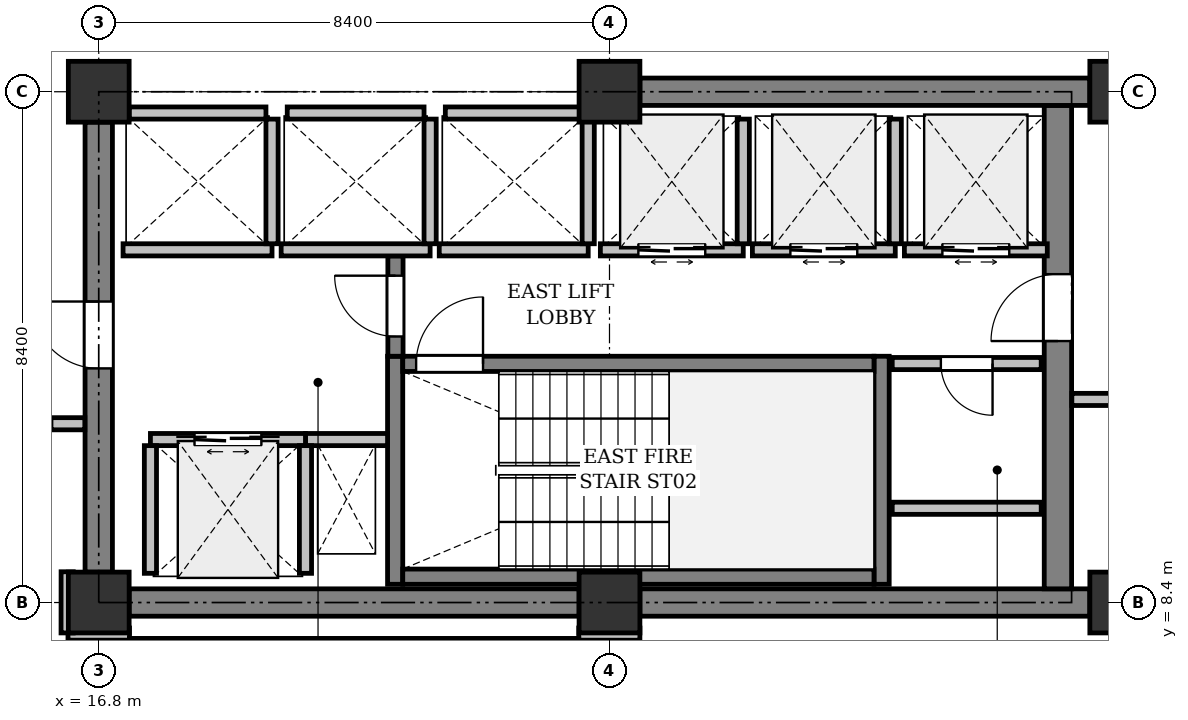
"""IFC4 building model, lengths in metres.
Left out: names, types, materials, properties, quantities, classifications, styles, units other than length and angle.
Written with IfcOpenShell. Run it as: python <this file> out.ifc"""

import sys

from ifc_helpers import new_model, si_unit, direction, frame, frame_2d, origin, origin_2d, place, context, subcontext, project, spatial, rectangle, extrude, element, fill, save


model = new_model("IFC4")
c1 = context("Model", 3, precision=1e-05, world=origin(), true_north=direction((0.0, 1.0)))
c2 = subcontext(c1, "Body", "Model", "MODEL_VIEW")
j1 = project(units=[si_unit("LENGTHUNIT", "METRE"), si_unit("PLANEANGLEUNIT", "RADIAN")], contexts=[c1])
p1 = place(None, origin())
s1 = spatial("IfcSite", under=j1, at=p1, CompositionType="ELEMENT")
p2 = place(p1, origin())
s2 = spatial("IfcBuilding", under=s1, at=p2, CompositionType="ELEMENT")
p3 = place(p2, frame((0.0, 0.0, 224.7)))
s3 = spatial("IfcBuildingStorey", under=s2, at=p3, CompositionType="ELEMENT", Elevation=224.7)
for number, where, z_axis, x_axis in (
    (1, (16.8, 8.4, 0.0), (0.0, 0.0, 1.0), (1.0, 0.0, 0.0)),
    (2, (16.8, 16.8, 0.0), (0.0, 0.0, 1.0), (1.0, 0.0, 0.0)),
    (3, (25.2, 8.4, 0.0), (0.0, 0.0, 1.0), (1.0, 0.0, 0.0)),
    (4, (25.2, 16.8, 0.0), (0.0, 0.0, 1.0), (1.0, 0.0, 0.0)),
    (5, (33.6, 8.4, 0.0), (0.0, 0.0, 1.0), (1.0, 0.0, 0.0)),
    (6, (33.6, 16.8, 0.0), (0.0, 0.0, 1.0), (1.0, 0.0, 0.0)),
):
    element("IfcColumn", number, at=place(p3, frame(where, z_axis=z_axis, x_axis=x_axis)), inside=s3, PredefinedType="COLUMN", context=c2, shape_type="SweptSolid", body=[
        extrude(rectangle(XDim=1.0, YDim=1.0, at=origin_2d()), origin(), (0.0, 0.0, 1.0), 4.1),
    ])
p4 = place(p3, frame((17.3, 8.4, 0.0), z_axis=(0.0, 0.0, 1.0), x_axis=(1.0, 0.0, 0.0)))
e7 = element("IfcWall", 7, at=p4, inside=s3, PredefinedType="SHEAR", context=c2, shape_type="SweptSolid", body=[
    extrude(rectangle(XDim=7.4, YDim=0.45, at=frame_2d((3.7, 0.0))), origin(), (0.0, 0.0, 1.0), 3.825),
])
p5 = place(p3, frame((25.7, 8.4, 0.0), z_axis=(0.0, 0.0, 1.0), x_axis=(1.0, 0.0, 0.0)))
e8 = element("IfcWall", 8, at=p5, inside=s3, PredefinedType="SHEAR", context=c2, shape_type="SweptSolid", body=[
    extrude(rectangle(XDim=7.4, YDim=0.45, at=frame_2d((3.7, 0.0))), origin(), (0.0, 0.0, 1.0), 3.825),
])
p6 = place(p3, frame((32.575, 8.625, 0.0), z_axis=(0.0, 0.0, 1.0), x_axis=(0.0, 1.0, 0.0)))
e9 = element("IfcWall", 9, at=p6, inside=s3, PredefinedType="SHEAR", context=c2, shape_type="SweptSolid", body=[
    extrude(rectangle(XDim=7.95, YDim=0.45, at=frame_2d((3.975, 0.0))), origin(), (0.0, 0.0, 1.0), 3.825),
])
p7 = place(p6, frame((4.075, 0.0, 0.0)))
e10 = element("IfcOpeningElement", 10, at=p7, cuts=e9, PredefinedType="OPENING", context=c2, shape_type="SweptSolid", body=[
    extrude(rectangle(XDim=1.1, YDim=2.15, at=frame_2d((0.55, 1.075))), frame((0.0, 0.235, 0.0), z_axis=(0.0, -1.0, 0.0), x_axis=(1.0, 0.0, 0.0)), (0.0, 0.0, 1.0), 0.47),
])
p8 = place(p3, frame((16.8, 8.9, 0.0), z_axis=(0.0, 0.0, 1.0), x_axis=(0.0, 1.0, 0.0)))
e11 = element("IfcWall", 11, at=p8, inside=s3, PredefinedType="SHEAR", context=c2, shape_type="SweptSolid", body=[
    extrude(rectangle(XDim=7.4, YDim=0.45, at=frame_2d((3.7, 0.0))), origin(), (0.0, 0.0, 1.0), 3.825),
])
p9 = place(p8, frame((3.35, 0.0, 0.0)))
e12 = element("IfcOpeningElement", 12, at=p9, cuts=e11, PredefinedType="OPENING", context=c2, shape_type="SweptSolid", body=[
    extrude(rectangle(XDim=1.1, YDim=2.15, at=frame_2d((0.55, 1.075))), frame((0.0, 0.235, 0.0), z_axis=(0.0, -1.0, 0.0), x_axis=(1.0, 0.0, 0.0)), (0.0, 0.0, 1.0), 0.47),
])
p10 = place(p3, frame((25.7, 16.8, 0.0), z_axis=(0.0, 0.0, 1.0), x_axis=(1.0, 0.0, 0.0)))
e13 = element("IfcWall", 13, at=p10, inside=s3, PredefinedType="SHEAR", context=c2, shape_type="SweptSolid", body=[
    extrude(rectangle(XDim=7.4, YDim=0.45, at=frame_2d((3.7, 0.0))), origin(), (0.0, 0.0, 1.0), 3.825),
])
for number, where, z_axis, x_axis in (
    (14, (21.675, 8.7, 0.0), (0.0, 0.0, 1.0), (0.0, 1.0, 0.0)),
    (15, (29.675, 8.7, 0.0), (0.0, 0.0, 1.0), (0.0, 1.0, 0.0)),
):
    element("IfcWall", number, at=place(p3, frame(where, z_axis=z_axis, x_axis=x_axis)), inside=s3, PredefinedType="SHEAR", context=c2, shape_type="SweptSolid", body=[
        extrude(rectangle(XDim=3.75, YDim=0.25, at=frame_2d((1.875, 0.0))), origin(), (0.0, 0.0, 1.0), 3.825),
    ])
p11 = place(p3, frame((21.8, 8.825, 0.0), z_axis=(0.0, 0.0, 1.0), x_axis=(1.0, 0.0, 0.0)))
e16 = element("IfcWall", 16, at=p11, inside=s3, PredefinedType="SHEAR", context=c2, shape_type="SweptSolid", body=[
    extrude(rectangle(XDim=7.75, YDim=0.25, at=frame_2d((3.875, 0.0))), origin(), (0.0, 0.0, 1.0), 3.825),
])
p12 = place(p3, frame((21.8, 12.325, 0.0), z_axis=(0.0, 0.0, 1.0), x_axis=(1.0, 0.0, 0.0)))
e17 = element("IfcWall", 17, at=p12, inside=s3, PredefinedType="SHEAR", context=c2, shape_type="SweptSolid", body=[
    extrude(rectangle(XDim=7.75, YDim=0.25, at=frame_2d((3.875, 0.0))), origin(), (0.0, 0.0, 1.0), 3.825),
])
p13 = place(p12, frame((0.22, 0.0, 0.0)))
e18 = element("IfcOpeningElement", 18, at=p13, cuts=e17, PredefinedType="OPENING", context=c2, shape_type="SweptSolid", body=[
    extrude(rectangle(XDim=1.1, YDim=2.15, at=frame_2d((0.55, 1.075))), frame((0.0, 0.135, 0.0), z_axis=(0.0, -1.0, 0.0), x_axis=(1.0, 0.0, 0.0)), (0.0, 0.0, 1.0), 0.27),
])
p14 = place(p3, frame((20.2, 11.08, 0.0), z_axis=(0.0, 0.0, 1.0), x_axis=(1.0, 0.0, 0.0)))
e19 = element("IfcWall", 19, at=p14, inside=s3, PredefinedType="PARTITIONING", context=c2, shape_type="SweptSolid", body=[
    extrude(rectangle(XDim=1.35, YDim=0.2, at=frame_2d((0.675, 0.0))), origin(), (0.0, 0.0, 1.0), 3.825),
])
p15 = place(p3, frame((21.68, 12.45, 0.0), z_axis=(0.0, 0.0, 1.0), x_axis=(0.0, 1.0, 0.0)))
e20 = element("IfcWall", 20, at=p15, inside=s3, PredefinedType="SHEAR", context=c2, shape_type="SweptSolid", body=[
    extrude(rectangle(XDim=1.65, YDim=0.25, at=frame_2d((0.825, 0.0))), origin(), (0.0, 0.0, 1.0), 3.825),
])
p16 = place(p15, frame((0.325, 0.0, 0.0)))
e21 = element("IfcOpeningElement", 21, at=p16, cuts=e20, PredefinedType="OPENING", context=c2, shape_type="SweptSolid", body=[
    extrude(rectangle(XDim=1.0, YDim=2.15, at=frame_2d((0.5, 1.075))), frame((0.0, 0.135, 0.0), z_axis=(0.0, -1.0, 0.0), x_axis=(1.0, 0.0, 0.0)), (0.0, 0.0, 1.0), 0.27),
])
p17 = place(p3, frame((17.65, 11.08, 0.0), z_axis=(0.0, 0.0, 1.0), x_axis=(1.0, 0.0, 0.0)))
e22 = element("IfcWall", 22, at=p17, inside=s3, PredefinedType="PARTITIONING", context=c2, shape_type="SweptSolid", body=[
    extrude(rectangle(XDim=2.55, YDim=0.2, at=frame_2d((1.275, 0.0))), origin(), (0.0, 0.0, 1.0), 3.825),
])
p18 = place(p17, frame((0.725, 0.0, 0.0)))
e23 = element("IfcOpeningElement", 23, at=p18, cuts=e22, PredefinedType="OPENING", context=c2, shape_type="SweptSolid", body=[
    extrude(rectangle(XDim=1.1, YDim=2.2, at=frame_2d((0.55, 1.1))), frame((0.0, 0.11, 0.0), z_axis=(0.0, -1.0, 0.0), x_axis=(1.0, 0.0, 0.0)), (0.0, 0.0, 1.0), 0.22),
])
for number, where, z_axis, x_axis in (
    (24, (20.2, 8.88, 0.0), (0.0, 0.0, 1.0), (0.0, 1.0, 0.0)),
    (25, (17.65, 8.88, 0.0), (0.0, 0.0, 1.0), (0.0, 1.0, 0.0)),
):
    element("IfcWall", number, at=place(p3, frame(where, z_axis=z_axis, x_axis=x_axis)), inside=s3, PredefinedType="PARTITIONING", context=c2, shape_type="SweptSolid", body=[
        extrude(rectangle(XDim=2.1, YDim=0.2, at=frame_2d((1.05, 0.0))), origin(), (0.0, 0.0, 1.0), 3.825),
    ])
p19 = place(p3, frame((17.2, 14.2, 0.0), z_axis=(0.0, 0.0, 1.0), x_axis=(1.0, 0.0, 0.0)))
e26 = element("IfcWall", 26, at=p19, inside=s3, PredefinedType="PARTITIONING", context=c2, shape_type="SweptSolid", body=[
    extrude(rectangle(XDim=2.45, YDim=0.2, at=frame_2d((1.225, 0.0))), origin(), (0.0, 0.0, 1.0), 3.825),
])
p20 = place(p3, frame((19.65, 14.3, 0.0), z_axis=(0.0, 0.0, 1.0), x_axis=(0.0, 1.0, 0.0)))
e27 = element("IfcWall", 27, at=p20, inside=s3, PredefinedType="PARTITIONING", context=c2, shape_type="SweptSolid", body=[
    extrude(rectangle(XDim=2.05, YDim=0.2, at=frame_2d((1.025, 0.0))), origin(), (0.0, 0.0, 1.0), 3.825),
])
p21 = place(p3, frame((17.3, 16.45, 0.0), z_axis=(0.0, 0.0, 1.0), x_axis=(1.0, 0.0, 0.0)))
e28 = element("IfcWall", 28, at=p21, inside=s3, PredefinedType="PARTITIONING", context=c2, shape_type="SweptSolid", body=[
    extrude(rectangle(XDim=2.25, YDim=0.2, at=frame_2d((1.125, 0.0))), origin(), (0.0, 0.0, 1.0), 3.825),
])
p22 = place(p3, frame((19.8, 14.2, 0.0), z_axis=(0.0, 0.0, 1.0), x_axis=(1.0, 0.0, 0.0)))
e29 = element("IfcWall", 29, at=p22, inside=s3, PredefinedType="PARTITIONING", context=c2, shape_type="SweptSolid", body=[
    extrude(rectangle(XDim=2.45, YDim=0.2, at=frame_2d((1.225, 0.0))), origin(), (0.0, 0.0, 1.0), 3.825),
])
p23 = place(p3, frame((22.25, 14.3, 0.0), z_axis=(0.0, 0.0, 1.0), x_axis=(0.0, 1.0, 0.0)))
e30 = element("IfcWall", 30, at=p23, inside=s3, PredefinedType="PARTITIONING", context=c2, shape_type="SweptSolid", body=[
    extrude(rectangle(XDim=2.05, YDim=0.2, at=frame_2d((1.025, 0.0))), origin(), (0.0, 0.0, 1.0), 3.825),
])
p24 = place(p3, frame((19.9, 16.45, 0.0), z_axis=(0.0, 0.0, 1.0), x_axis=(1.0, 0.0, 0.0)))
e31 = element("IfcWall", 31, at=p24, inside=s3, PredefinedType="PARTITIONING", context=c2, shape_type="SweptSolid", body=[
    extrude(rectangle(XDim=2.25, YDim=0.2, at=frame_2d((1.125, 0.0))), origin(), (0.0, 0.0, 1.0), 3.825),
])
p25 = place(p3, frame((22.4, 14.2, 0.0), z_axis=(0.0, 0.0, 1.0), x_axis=(1.0, 0.0, 0.0)))
e32 = element("IfcWall", 32, at=p25, inside=s3, PredefinedType="PARTITIONING", context=c2, shape_type="SweptSolid", body=[
    extrude(rectangle(XDim=2.45, YDim=0.2, at=frame_2d((1.225, 0.0))), origin(), (0.0, 0.0, 1.0), 3.825),
])
p26 = place(p3, frame((24.85, 14.3, 0.0), z_axis=(0.0, 0.0, 1.0), x_axis=(0.0, 1.0, 0.0)))
e33 = element("IfcWall", 33, at=p26, inside=s3, PredefinedType="PARTITIONING", context=c2, shape_type="SweptSolid", body=[
    extrude(rectangle(XDim=2.05, YDim=0.2, at=frame_2d((1.025, 0.0))), origin(), (0.0, 0.0, 1.0), 3.825),
])
p27 = place(p3, frame((22.5, 16.45, 0.0), z_axis=(0.0, 0.0, 1.0), x_axis=(1.0, 0.0, 0.0)))
e34 = element("IfcWall", 34, at=p27, inside=s3, PredefinedType="PARTITIONING", context=c2, shape_type="SweptSolid", body=[
    extrude(rectangle(XDim=2.25, YDim=0.2, at=frame_2d((1.125, 0.0))), origin(), (0.0, 0.0, 1.0), 3.825),
])
p28 = place(p3, frame((25.05, 14.2, 0.0), z_axis=(0.0, 0.0, 1.0), x_axis=(1.0, 0.0, 0.0)))
e35 = element("IfcWall", 35, at=p28, inside=s3, PredefinedType="PARTITIONING", context=c2, shape_type="SweptSolid", body=[
    extrude(rectangle(XDim=2.35, YDim=0.2, at=frame_2d((1.175, 0.0))), origin(), (0.0, 0.0, 1.0), 3.825),
])
p29 = place(p28, frame((0.625, 0.0, 0.0)))
e36 = element("IfcOpeningElement", 36, at=p29, cuts=e35, PredefinedType="OPENING", context=c2, shape_type="SweptSolid", body=[
    extrude(rectangle(XDim=1.1, YDim=2.2, at=frame_2d((0.55, 1.1))), frame((0.0, 0.11, 0.0), z_axis=(0.0, -1.0, 0.0), x_axis=(1.0, 0.0, 0.0)), (0.0, 0.0, 1.0), 0.22),
])
p30 = place(p3, frame((27.4, 14.3, 0.0), z_axis=(0.0, 0.0, 1.0), x_axis=(0.0, 1.0, 0.0)))
e37 = element("IfcWall", 37, at=p30, inside=s3, PredefinedType="PARTITIONING", context=c2, shape_type="SweptSolid", body=[
    extrude(rectangle(XDim=2.05, YDim=0.2, at=frame_2d((1.025, 0.0))), origin(), (0.0, 0.0, 1.0), 3.825),
])
p31 = place(p3, frame((27.55, 14.2, 0.0), z_axis=(0.0, 0.0, 1.0), x_axis=(1.0, 0.0, 0.0)))
e38 = element("IfcWall", 38, at=p31, inside=s3, PredefinedType="PARTITIONING", context=c2, shape_type="SweptSolid", body=[
    extrude(rectangle(XDim=2.35, YDim=0.2, at=frame_2d((1.175, 0.0))), origin(), (0.0, 0.0, 1.0), 3.825),
])
p32 = place(p31, frame((0.625, 0.0, 0.0)))
e39 = element("IfcOpeningElement", 39, at=p32, cuts=e38, PredefinedType="OPENING", context=c2, shape_type="SweptSolid", body=[
    extrude(rectangle(XDim=1.1, YDim=2.2, at=frame_2d((0.55, 1.1))), frame((0.0, 0.11, 0.0), z_axis=(0.0, -1.0, 0.0), x_axis=(1.0, 0.0, 0.0)), (0.0, 0.0, 1.0), 0.22),
])
p33 = place(p3, frame((29.9, 14.3, 0.0), z_axis=(0.0, 0.0, 1.0), x_axis=(0.0, 1.0, 0.0)))
e40 = element("IfcWall", 40, at=p33, inside=s3, PredefinedType="PARTITIONING", context=c2, shape_type="SweptSolid", body=[
    extrude(rectangle(XDim=2.05, YDim=0.2, at=frame_2d((1.025, 0.0))), origin(), (0.0, 0.0, 1.0), 3.825),
])
p34 = place(p3, frame((30.05, 14.2, 0.0), z_axis=(0.0, 0.0, 1.0), x_axis=(1.0, 0.0, 0.0)))
e41 = element("IfcWall", 41, at=p34, inside=s3, PredefinedType="PARTITIONING", context=c2, shape_type="SweptSolid", body=[
    extrude(rectangle(XDim=2.35, YDim=0.2, at=frame_2d((1.175, 0.0))), origin(), (0.0, 0.0, 1.0), 3.825),
])
p35 = place(p34, frame((0.625, 0.0, 0.0)))
e42 = element("IfcOpeningElement", 42, at=p35, cuts=e41, PredefinedType="OPENING", context=c2, shape_type="SweptSolid", body=[
    extrude(rectangle(XDim=1.1, YDim=2.2, at=frame_2d((0.55, 1.1))), frame((0.0, 0.11, 0.0), z_axis=(0.0, -1.0, 0.0), x_axis=(1.0, 0.0, 0.0)), (0.0, 0.0, 1.0), 0.22),
])
p36 = place(p3, frame((32.3, 12.33, 0.0), z_axis=(0.0, 0.0, 1.0), x_axis=(-1.0, 0.0, 0.0)))
e43 = element("IfcWall", 43, at=p36, inside=s3, PredefinedType="PARTITIONING", context=c2, shape_type="SweptSolid", body=[
    extrude(rectangle(XDim=2.45, YDim=0.2, at=frame_2d((1.225, 0.0))), origin(), (0.0, 0.0, 1.0), 3.825),
])
p37 = place(p36, frame((0.8, 0.0, 0.0)))
e44 = element("IfcOpeningElement", 44, at=p37, cuts=e43, PredefinedType="OPENING", context=c2, shape_type="SweptSolid", body=[
    extrude(rectangle(XDim=0.85, YDim=2.15, at=frame_2d((0.425, 1.075))), frame((0.0, 0.11, 0.0), z_axis=(0.0, -1.0, 0.0), x_axis=(1.0, 0.0, 0.0)), (0.0, 0.0, 1.0), 0.22),
])
p38 = place(p3, frame((29.85, 9.95, 0.0), z_axis=(0.0, 0.0, 1.0), x_axis=(1.0, 0.0, 0.0)))
e45 = element("IfcWall", 45, at=p38, inside=s3, PredefinedType="PARTITIONING", context=c2, shape_type="SweptSolid", body=[
    extrude(rectangle(XDim=2.45, YDim=0.2, at=frame_2d((1.225, 0.0))), origin(), (0.0, 0.0, 1.0), 3.825),
])
p39 = place(p3, frame((34.236, 11.74, 0.0), z_axis=(0.0, 0.0, 1.0), x_axis=(-1.0, 0.0, 0.0)))
e46 = element("IfcWall", 46, at=p39, inside=s3, PredefinedType="PARTITIONING", context=c2, shape_type="SweptSolid", body=[
    extrude(rectangle(XDim=1.432, YDim=0.2, at=frame_2d((0.716, 0.0))), origin(), (0.0, 0.0, 1.0), 3.371),
])
p40 = place(p3, frame((25.7, 7.88, 0.0), z_axis=(0.0, 0.0, 1.0), x_axis=(-0.999999528702, 0.000970873329, 0.0)))
e47 = element("IfcWall", 47, at=p40, inside=s3, PredefinedType="PARTITIONING", context=c2, shape_type="SweptSolid", body=[
    extrude(rectangle(XDim=1.006, YDim=0.2, at=frame_2d((0.503, 0.0))), origin(), (0.0, 0.0, 1.0), 3.371),
])
p41 = place(p3, frame((17.306, 7.881, 0.0), z_axis=(0.0, 0.0, 1.0), x_axis=(-1.0, 0.0, 0.0)))
e48 = element("IfcWall", 48, at=p41, inside=s3, PredefinedType="PARTITIONING", context=c2, shape_type="SweptSolid", body=[
    extrude(rectangle(XDim=1.012, YDim=0.2, at=frame_2d((0.506, 0.0))), origin(), (0.0, 0.0, 1.0), 3.371),
])
p42 = place(p3, frame((16.28, 7.9, 0.0), z_axis=(0.0, 0.0, 1.0), x_axis=(0.000970873329, 0.999999528702, 0.0)))
e49 = element("IfcWall", 49, at=p42, inside=s3, PredefinedType="PARTITIONING", context=c2, shape_type="SweptSolid", body=[
    extrude(rectangle(XDim=1.006, YDim=0.2, at=frame_2d((0.503, 0.0))), origin(), (0.0, 0.0, 1.0), 3.365),
])
p43 = place(p3, frame((16.571, 11.34, 0.0), z_axis=(0.0, 0.0, 1.0), x_axis=(-1.0, 0.0, 0.0)))
e50 = element("IfcWall", 50, at=p43, inside=s3, PredefinedType="PARTITIONING", context=c2, shape_type="SweptSolid", body=[
    extrude(rectangle(XDim=0.556, YDim=0.2, at=frame_2d((0.278, 0.0))), origin(), (0.0, 0.0, 1.0), 3.825),
])
p44 = place(p3, frame((17.306, 7.71, 0.0), z_axis=(0.0, 0.0, 1.0), x_axis=(0.999999999454, -3.3044743e-05, 0.0)))
e51 = element("IfcWall", 51, at=p44, inside=s3, PredefinedType="PARTITIONING", context=c2, shape_type="SweptSolid", body=[
    extrude(rectangle(XDim=7.388, YDim=0.2, at=frame_2d((3.694, 0.0))), origin(), (0.0, 0.0, 1.0), 3.518),
])
p45 = place(p7, origin())
e52 = element("IfcDoor", 52, at=p45, inside=s3, OperationType="SINGLE_SWING_LEFT", PredefinedType="DOOR", context=c2, shape_type="SweptSolid", body=[
    extrude(rectangle(XDim=1.1, YDim=2.15, at=frame_2d((0.55, 1.075))), frame((0.0, 0.025, 0.0), z_axis=(0.0, -1.0, 0.0), x_axis=(1.0, 0.0, 0.0)), (0.0, 0.0, 1.0), 0.05),
])
fill(e10, e52)
p46 = place(p9, origin())
e53 = element("IfcDoor", 53, at=p46, inside=s3, OperationType="SINGLE_SWING_RIGHT", PredefinedType="DOOR", context=c2, shape_type="SweptSolid", body=[
    extrude(rectangle(XDim=1.1, YDim=2.15, at=frame_2d((0.55, 1.075))), frame((0.0, 0.025, 0.0), z_axis=(0.0, -1.0, 0.0), x_axis=(1.0, 0.0, 0.0)), (0.0, 0.0, 1.0), 0.05),
])
fill(e12, e53)
p47 = place(p13, origin())
e54 = element("IfcDoor", 54, at=p47, inside=s3, OperationType="SINGLE_SWING_RIGHT", PredefinedType="DOOR", context=c2, shape_type="SweptSolid", body=[
    extrude(rectangle(XDim=1.1, YDim=2.15, at=frame_2d((0.55, 1.075))), frame((0.0, 0.025, 0.0), z_axis=(0.0, -1.0, 0.0), x_axis=(1.0, 0.0, 0.0)), (0.0, 0.0, 1.0), 0.05),
])
fill(e18, e54)
p48 = place(p16, origin())
e55 = element("IfcDoor", 55, at=p48, inside=s3, OperationType="SINGLE_SWING_RIGHT", PredefinedType="DOOR", context=c2, shape_type="SweptSolid", body=[
    extrude(rectangle(XDim=1.0, YDim=2.15, at=frame_2d((0.5, 1.075))), frame((0.0, 0.025, 0.0), z_axis=(0.0, -1.0, 0.0), x_axis=(1.0, 0.0, 0.0)), (0.0, 0.0, 1.0), 0.05),
])
fill(e21, e55)
p49 = place(p18, origin())
e56 = element("IfcDoor", 56, at=p49, inside=s3, OperationType="DOUBLE_DOOR_SLIDING", PredefinedType="DOOR", context=c2, shape_type="SweptSolid", body=[
    extrude(rectangle(XDim=1.1, YDim=2.2, at=frame_2d((0.55, 1.1))), frame((0.0, 0.025, 0.0), z_axis=(0.0, -1.0, 0.0), x_axis=(1.0, 0.0, 0.0)), (0.0, 0.0, 1.0), 0.05),
])
fill(e23, e56)
p50 = place(p29, origin())
e57 = element("IfcDoor", 57, at=p50, inside=s3, OperationType="DOUBLE_DOOR_SLIDING", PredefinedType="DOOR", context=c2, shape_type="SweptSolid", body=[
    extrude(rectangle(XDim=1.1, YDim=2.2, at=frame_2d((0.55, 1.1))), frame((0.0, 0.025, 0.0), z_axis=(0.0, -1.0, 0.0), x_axis=(1.0, 0.0, 0.0)), (0.0, 0.0, 1.0), 0.05),
])
fill(e36, e57)
p51 = place(p32, origin())
e58 = element("IfcDoor", 58, at=p51, inside=s3, OperationType="DOUBLE_DOOR_SLIDING", PredefinedType="DOOR", context=c2, shape_type="SweptSolid", body=[
    extrude(rectangle(XDim=1.1, YDim=2.2, at=frame_2d((0.55, 1.1))), frame((0.0, 0.025, 0.0), z_axis=(0.0, -1.0, 0.0), x_axis=(1.0, 0.0, 0.0)), (0.0, 0.0, 1.0), 0.05),
])
fill(e39, e58)
p52 = place(p35, origin())
e59 = element("IfcDoor", 59, at=p52, inside=s3, OperationType="DOUBLE_DOOR_SLIDING", PredefinedType="DOOR", context=c2, shape_type="SweptSolid", body=[
    extrude(rectangle(XDim=1.1, YDim=2.2, at=frame_2d((0.55, 1.1))), frame((0.0, 0.025, 0.0), z_axis=(0.0, -1.0, 0.0), x_axis=(1.0, 0.0, 0.0)), (0.0, 0.0, 1.0), 0.05),
])
fill(e42, e59)
p53 = place(p37, origin())
e60 = element("IfcDoor", 60, at=p53, inside=s3, OperationType="SINGLE_SWING_LEFT", PredefinedType="DOOR", context=c2, shape_type="SweptSolid", body=[
    extrude(rectangle(XDim=0.85, YDim=2.15, at=frame_2d((0.425, 1.075))), frame((0.0, 0.025, 0.0), z_axis=(0.0, -1.0, 0.0), x_axis=(1.0, 0.0, 0.0)), (0.0, 0.0, 1.0), 0.05),
])
fill(e44, e60)
save(model, sys.argv[1])
